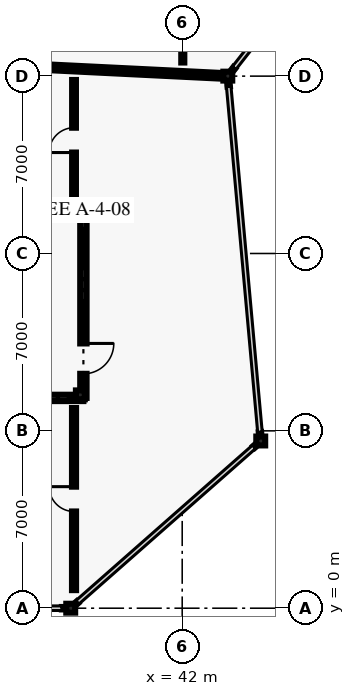
"""IFC4 building model, lengths in metres.
Left out: names, types, materials, properties, quantities, classifications, styles, units other than length and angle.
Written with IfcOpenShell. Run it as: python <this file> out.ifc"""

import sys

from ifc_helpers import new_model, si_unit, direction, frame, frame_2d, origin, origin_2d, place, context, subcontext, project, spatial, rectangle, i_section, extrude, element, fill, save


model = new_model("IFC4")
c1 = context("Model", 3, precision=1e-05, world=origin(), true_north=direction((0.0, 1.0)))
c2 = subcontext(c1, "Body", "Model", "MODEL_VIEW")
j1 = project(units=[si_unit("LENGTHUNIT", "METRE"), si_unit("PLANEANGLEUNIT", "RADIAN")], contexts=[c1])
p1 = place(None, origin())
s1 = spatial("IfcSite", under=j1, at=p1, CompositionType="ELEMENT")
p2 = place(p1, origin())
s2 = spatial("IfcBuilding", under=s1, at=p2, CompositionType="ELEMENT")
p3 = place(p2, origin())
s3 = spatial("IfcBuildingStorey", under=s2, at=p3, CompositionType="ELEMENT", Elevation=0.0)
for number, where, z_axis, x_axis in (
    (1, (37.6, 0.0, 0.0), (0.0, 0.0, 1.0), (1.0, 0.0, 0.0)),
    (2, (43.8, 21.0, 0.0), (0.0, 0.0, 1.0), (1.0, 0.0, 0.0)),
    (3, (45.1, 6.6, 0.0), (0.0, 0.0, 1.0), (1.0, 0.0, 0.0)),
    (4, (37.98, 8.42, 0.0), (0.0, 0.0, 1.0), (1.0, 0.0, 0.0)),
    (5, (37.98, 15.58, 0.0), (0.0, 0.0, 1.0), (1.0, 0.0, 0.0)),
):
    element("IfcColumn", number, at=place(p3, frame(where, z_axis=z_axis, x_axis=x_axis)), inside=s3, PredefinedType="COLUMN", context=c2, shape_type="SweptSolid", body=[
        extrude(i_section(OverallWidth=0.35, OverallDepth=0.35, WebThickness=0.02, FlangeThickness=0.028, at=origin_2d()), origin(), (0.0, 0.0, 1.0), 5.4),
    ])
p4 = place(p3, frame((37.558, 0.0, 0.0), z_axis=(0.0, 0.0, 1.0), x_axis=(-1.0, 0.0, 0.0)))
e6 = element("IfcWall", 6, at=p4, inside=s3, PredefinedType="SOLIDWALL", context=c2, shape_type="SweptSolid", body=[
    extrude(rectangle(XDim=0.308, YDim=0.095, at=frame_2d((0.154, 0.0))), origin(), (0.0, 0.0, 1.0), 4.22),
])
p5 = place(p3, frame((45.068, 6.572, 0.0), z_axis=(0.0, 0.0, 1.0), x_axis=(-0.75124833206, -0.660019653932, 0.0)))
e7 = element("IfcWall", 7, at=p5, inside=s3, PredefinedType="SOLIDWALL", context=c2, shape_type="SweptSolid", body=[
    extrude(rectangle(XDim=0.308, YDim=0.095, at=frame_2d((0.154, 0.0))), origin(), (0.0, 0.0, 1.0), 4.22),
])
p6 = place(p3, frame((37.863, 0.231, 0.0), z_axis=(0.0, 0.0, 1.0), x_axis=(-0.751296149946, -0.659965222627, 0.0)))
e8 = element("IfcWall", 8, at=p6, inside=s3, PredefinedType="SOLIDWALL", context=c2, shape_type="SweptSolid", body=[
    extrude(rectangle(XDim=0.307, YDim=0.095, at=frame_2d((0.154, 0.0))), origin(), (0.0, 0.0, 1.0), 4.22),
])
for number, where, z_axis, x_axis in (
    (9, (43.809, 20.898, 0.0), (0.0, 0.0, 1.0), (0.087, -0.996, 0.0)),
    (10, (45.069, 6.949, 0.0), (0.0, 0.0, 1.0), (0.087, -0.996, 0.0)),
):
    element("IfcWall", number, at=place(p3, frame(where, z_axis=z_axis, x_axis=x_axis)), inside=s3, PredefinedType="SOLIDWALL", context=c2, shape_type="SweptSolid", body=[
        extrude(rectangle(XDim=0.308, YDim=0.095, at=frame_2d((0.154, 0.0))), origin(), (0.0, 0.0, 1.0), 4.22),
    ])
p7 = place(p3, frame((44.053, 21.323, 0.0), z_axis=(0.0, 0.0, 1.0), x_axis=(-0.615966636313, -0.787772240529, 0.0)))
e11 = element("IfcWall", 11, at=p7, inside=s3, PredefinedType="SOLIDWALL", context=c2, shape_type="SweptSolid", body=[
    extrude(rectangle(XDim=0.308, YDim=0.095, at=frame_2d((0.154, 0.0))), origin(), (0.0, 0.0, 1.0), 4.22),
])
p8 = place(p3, frame((43.8, 21.0, 0.0), z_axis=(0.0, 0.0, 1.0), x_axis=(-0.998788882418, 0.049201304434, 0.0)))
e12 = element("IfcWall", 12, at=p8, inside=s3, PredefinedType="SOLIDWALL", context=c2, shape_type="SweptSolid", body=[
    extrude(rectangle(XDim=20.325, YDim=0.225, at=frame_2d((10.162, 0.0))), origin(), (0.0, 0.0, 1.0), 4.62),
])
p9 = place(p8, frame((9.212, 0.0, 0.0)))
e13 = element("IfcOpeningElement", 13, at=p9, cuts=e12, PredefinedType="OPENING", context=c2, shape_type="SweptSolid", body=[
    extrude(rectangle(XDim=1.9, YDim=2.35, at=frame_2d((0.95, 1.175))), frame((0.0, 0.123, 0.0), z_axis=(0.0, -1.0, 0.0), x_axis=(1.0, 0.0, 0.0)), (0.0, 0.0, 1.0), 0.245),
])
p10 = place(p3, frame((37.73, 0.714, 0.0), z_axis=(0.0, 0.0, 1.0), x_axis=(0.0, 1.0, 0.0)))
e14 = element("IfcWall", 14, at=p10, inside=s3, PredefinedType="PARTITIONING", context=c2, shape_type="SweptSolid", body=[
    extrude(rectangle(XDim=7.186, YDim=0.16, at=frame_2d((3.593, 0.0))), origin(), (0.0, 0.0, 1.0), 3.92),
])
p11 = place(p10, frame((3.103, 0.0, 0.0)))
e15 = element("IfcOpeningElement", 15, at=p11, cuts=e14, PredefinedType="OPENING", context=c2, shape_type="SweptSolid", body=[
    extrude(rectangle(XDim=0.98, YDim=2.15, at=frame_2d((0.49, 1.075))), frame((0.0, 0.09, 0.0), z_axis=(0.0, -1.0, 0.0), x_axis=(1.0, 0.0, 0.0)), (0.0, 0.0, 1.0), 0.18),
])
p12 = place(p3, frame((37.73, 16.1, 0.0), z_axis=(0.0, 0.0, 1.0), x_axis=(0.0, 1.0, 0.0)))
e16 = element("IfcWall", 16, at=p12, inside=s3, PredefinedType="PARTITIONING", context=c2, shape_type="SweptSolid", body=[
    extrude(rectangle(XDim=4.748, YDim=0.15, at=frame_2d((2.374, 0.0))), origin(), (0.0, 0.0, 1.0), 3.92),
])
p13 = place(p12, frame((1.884, 0.0, 0.0)))
e17 = element("IfcOpeningElement", 17, at=p13, cuts=e16, PredefinedType="OPENING", context=c2, shape_type="SweptSolid", body=[
    extrude(rectangle(XDim=0.98, YDim=2.15, at=frame_2d((0.49, 1.075))), frame((0.0, 0.085, 0.0), z_axis=(0.0, -1.0, 0.0), x_axis=(1.0, 0.0, 0.0)), (0.0, 0.0, 1.0), 0.17),
])
p14 = place(p3, frame((42.023, 21.538, 0.0), z_axis=(0.0, 0.0, 1.0), x_axis=(0.0, 1.0, 0.0)))
e18 = element("IfcWall", 18, at=p14, inside=s3, PredefinedType="PARTITIONING", context=c2, shape_type="SweptSolid", body=[
    extrude(rectangle(XDim=18.532, YDim=0.12, at=frame_2d((9.266, 0.0))), origin(), (0.0, 0.0, 1.0), 3.92),
])
p15 = place(p14, frame((8.776, 0.0, 0.0)))
e19 = element("IfcOpeningElement", 19, at=p15, cuts=e18, PredefinedType="OPENING", context=c2, shape_type="SweptSolid", body=[
    extrude(rectangle(XDim=0.98, YDim=2.15, at=frame_2d((0.49, 1.075))), frame((0.0, 0.07, 0.0), z_axis=(0.0, -1.0, 0.0), x_axis=(1.0, 0.0, 0.0)), (0.0, 0.0, 1.0), 0.14),
])
for number, where, z_axis, x_axis in (
    (20, (28.9, 15.7, 0.0), (0.0, 0.0, 1.0), (1.0, 0.0, 0.0)),
    (21, (38.1, 8.3, 0.0), (0.0, 0.0, 1.0), (-1.0, 0.0, 0.0)),
):
    element("IfcWall", number, at=place(p3, frame(where, z_axis=z_axis, x_axis=x_axis)), inside=s3, PredefinedType="SHEAR", context=c2, shape_type="SweptSolid", body=[
        extrude(rectangle(XDim=9.2, YDim=0.25, at=frame_2d((4.6, 0.0))), origin(), (0.0, 0.0, 1.0), 5.16),
    ])
p16 = place(p3, frame((38.1, 15.7, 0.0), z_axis=(0.0, 0.0, 1.0), x_axis=(0.0, -1.0, 0.0)))
e22 = element("IfcWall", 22, at=p16, inside=s3, PredefinedType="SHEAR", context=c2, shape_type="SweptSolid", body=[
    extrude(rectangle(XDim=7.4, YDim=0.25, at=frame_2d((3.7, 0.0))), origin(), (0.0, 0.0, 1.0), 5.16),
])
p17 = place(p16, frame((5.25, 0.0, 0.0)))
e23 = element("IfcOpeningElement", 23, at=p17, cuts=e22, PredefinedType="OPENING", context=c2, shape_type="SweptSolid", body=[
    extrude(rectangle(XDim=1.2, YDim=2.2, at=frame_2d((0.6, 1.1))), frame((0.0, 0.135, 0.0), z_axis=(0.0, -1.0, 0.0), x_axis=(1.0, 0.0, 0.0)), (0.0, 0.0, 1.0), 0.27),
])
p18 = place(p11, origin())
e24 = element("IfcDoor", 24, at=p18, inside=s3, OperationType="SINGLE_SWING_RIGHT", PredefinedType="DOOR", context=c2, shape_type="SweptSolid", body=[
    extrude(rectangle(XDim=0.98, YDim=2.15, at=frame_2d((0.49, 1.075))), frame((0.0, 0.025, 0.0), z_axis=(0.0, -1.0, 0.0), x_axis=(1.0, 0.0, 0.0)), (0.0, 0.0, 1.0), 0.05),
])
fill(e15, e24)
p19 = place(p13, origin())
e25 = element("IfcDoor", 25, at=p19, inside=s3, OperationType="SINGLE_SWING_LEFT", PredefinedType="DOOR", context=c2, shape_type="SweptSolid", body=[
    extrude(rectangle(XDim=0.98, YDim=2.15, at=frame_2d((0.49, 1.075))), frame((0.0, 0.025, 0.0), z_axis=(0.0, -1.0, 0.0), x_axis=(1.0, 0.0, 0.0)), (0.0, 0.0, 1.0), 0.05),
])
fill(e17, e25)
p20 = place(p17, origin())
e26 = element("IfcDoor", 26, at=p20, inside=s3, OperationType="SINGLE_SWING_LEFT", PredefinedType="DOOR", context=c2, shape_type="SweptSolid", body=[
    extrude(rectangle(XDim=1.2, YDim=2.2, at=frame_2d((0.6, 1.1))), frame((0.0, 0.025, 0.0), z_axis=(0.0, -1.0, 0.0), x_axis=(1.0, 0.0, 0.0)), (0.0, 0.0, 1.0), 0.05),
])
fill(e23, e26)
save(model, sys.argv[1])
